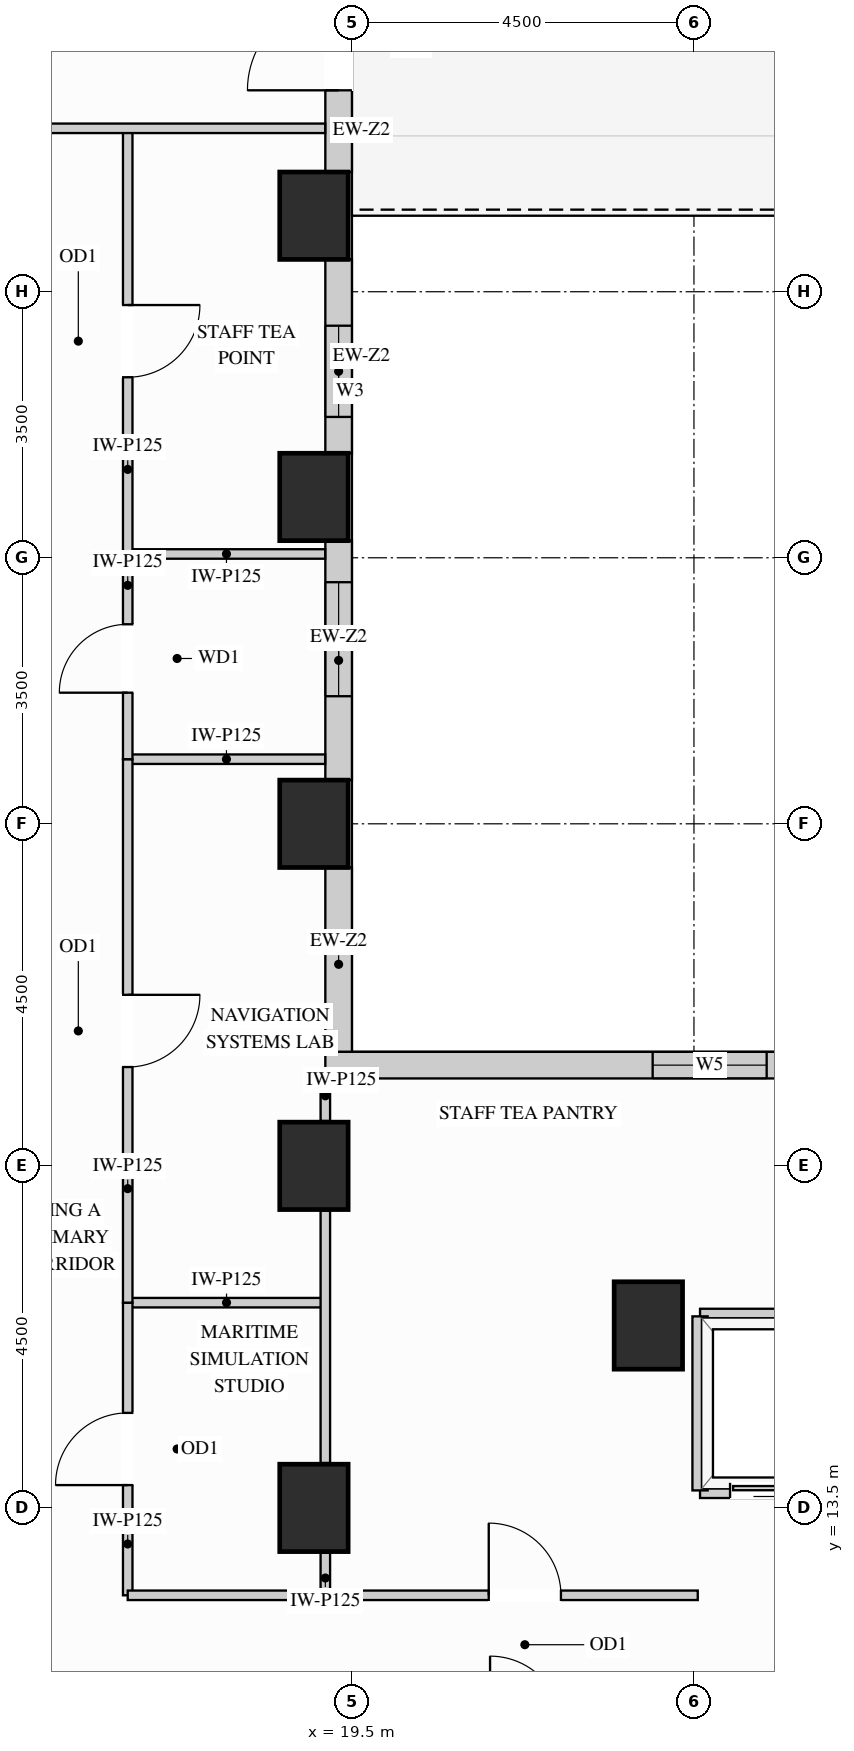
"""IFC4 building model, lengths in metres.
Left out: names, types, materials, properties, quantities, classifications, styles, units other than length and angle.
Written with IfcOpenShell. Run it as: python <this file> out.ifc"""

import sys

from ifc_helpers import new_model, si_unit, direction, frame, frame_2d, origin, origin_2d, place, context, subcontext, project, spatial, rectangle, extrude, source, transform, mapped, element, fill, save


model = new_model("IFC4")
c1 = context("Model", 3, precision=1e-05, world=origin(), true_north=direction((0.0, 1.0)))
c2 = subcontext(c1, "Body", "Model", "MODEL_VIEW")
j1 = project(units=[si_unit("LENGTHUNIT", "METRE"), si_unit("PLANEANGLEUNIT", "RADIAN")], contexts=[c1])
p1 = place(None, origin())
s1 = spatial("IfcSite", under=j1, at=p1, CompositionType="ELEMENT")
p2 = place(p1, origin())
s2 = spatial("IfcBuilding", under=s1, at=p2, CompositionType="ELEMENT")
p3 = place(p2, frame((0.0, 0.0, 127.8)))
s3 = spatial("IfcBuildingStorey", under=s2, at=p3, CompositionType="ELEMENT", Elevation=127.8)
m1 = source(origin(), c2, "Body", "SweptSolid", [
    extrude(rectangle(XDim=0.9, YDim=1.15, at=origin_2d()), origin(), (0.0, 0.0, 1.0), 3.38),
])
for number, where, z_axis, x_axis in (
    (1, (19.0, 13.5, 0.0), (0.0, 0.0, 1.0), (1.0, 0.0, 0.0)),
    (2, (19.0, 18.0, 0.0), (0.0, 0.0, 1.0), (1.0, 0.0, 0.0)),
    (3, (19.0, 22.5, 0.0), (0.0, 0.0, 1.0), (1.0, 0.0, 0.0)),
    (4, (19.0, 26.8, 0.0), (0.0, 0.0, 1.0), (1.0, 0.0, 0.0)),
    (5, (19.0, 30.5, 0.0), (0.0, 0.0, 1.0), (1.0, 0.0, 0.0)),
    (6, (23.4, 15.9, 0.0), (0.0, 0.0, 1.0), (1.0, 0.0, 0.0)),
):
    element("IfcColumn", number, at=place(p3, frame(where, z_axis=z_axis, x_axis=x_axis)), inside=s3, PredefinedType="COLUMN", context=c2, shape_type="MappedRepresentation", body=[
        mapped(m1, transform((0.0, 0.0, 0.0), x_axis=(1.0, 0.0, 0.0), y_axis=(0.0, 1.0, 0.0), z_axis=(0.0, 0.0, 1.0))),
    ])
m2 = source(origin(), c2, "Body", "SweptSolid", [
    extrude(rectangle(XDim=2.429, YDim=0.35, at=frame_2d((1.214, 0.0))), origin(), (0.0, 0.0, 1.0), 2.519),
])
p4 = place(p3, frame((19.325, 19.498, 0.0), z_axis=(0.0, 0.0, 1.0), x_axis=(0.0, 1.0, 0.0)))
e7 = element("IfcWall", 7, at=p4, inside=s3, PredefinedType="SOLIDWALL", context=c2, shape_type="MappedRepresentation", body=[
    mapped(m2, transform((0.0, 0.0, 0.0), x_axis=(1.0, 0.0, 0.0), y_axis=(0.0, 1.0, 0.0), z_axis=(0.0, 0.0, 1.0))),
])
p5 = place(p3, frame((19.325, 23.073, 0.0), z_axis=(0.0, 0.0, 1.0), x_axis=(0.0, 1.0, 0.0)))
e8 = element("IfcWall", 8, at=p5, inside=s3, PredefinedType="SOLIDWALL", context=c2, shape_type="SweptSolid", body=[
    extrude(rectangle(XDim=3.154, YDim=0.35, at=frame_2d((1.577, 0.0))), origin(), (0.0, 0.0, 1.0), 2.519),
])
p6 = place(p5, frame((1.105, 0.0, 0.78)))
e9 = element("IfcOpeningElement", 9, at=p6, cuts=e8, PredefinedType="OPENING", context=c2, shape_type="SweptSolid", body=[
    extrude(rectangle(XDim=1.5, YDim=1.559, at=frame_2d((0.75, 0.78))), frame((0.0, 0.185, 0.0), z_axis=(0.0, -1.0, 0.0), x_axis=(1.0, 0.0, 0.0)), (0.0, 0.0, 1.0), 0.37),
])
p7 = place(p3, frame((19.325, 27.373, 0.0), z_axis=(0.0, 0.0, 1.0), x_axis=(0.0, 1.0, 0.0)))
e10 = element("IfcWall", 10, at=p7, inside=s3, PredefinedType="SOLIDWALL", context=c2, shape_type="SweptSolid", body=[
    extrude(rectangle(XDim=2.554, YDim=0.35, at=frame_2d((1.277, 0.0))), origin(), (0.0, 0.0, 1.0), 2.519),
])
p8 = place(p7, frame((0.48, 0.0, 0.78)))
e11 = element("IfcOpeningElement", 11, at=p8, cuts=e10, PredefinedType="OPENING", context=c2, shape_type="SweptSolid", body=[
    extrude(rectangle(XDim=1.2, YDim=1.559, at=frame_2d((0.6, 0.78))), frame((0.0, 0.185, 0.0), z_axis=(0.0, -1.0, 0.0), x_axis=(1.0, 0.0, 0.0)), (0.0, 0.0, 1.0), 0.37),
])
p9 = place(p3, frame((19.325, 31.073, 0.0), z_axis=(0.0, 0.0, 1.0), x_axis=(0.0, 1.0, 0.0)))
e12 = element("IfcWall", 12, at=p9, inside=s3, PredefinedType="SOLIDWALL", context=c2, shape_type="SweptSolid", body=[
    extrude(rectangle(XDim=3.354, YDim=0.35, at=frame_2d((1.677, 0.0))), origin(), (0.0, 0.0, 1.0), 2.519),
])
p10 = place(p9, frame((1.077, 0.0, 0.0)))
e13 = element("IfcOpeningElement", 13, at=p10, cuts=e12, PredefinedType="OPENING", context=c2, shape_type="SweptSolid", body=[
    extrude(rectangle(XDim=1.2, YDim=2.15, at=frame_2d((0.6, 1.075))), frame((0.0, 0.185, 0.0), z_axis=(0.0, -1.0, 0.0), x_axis=(1.0, 0.0, 0.0)), (0.0, 0.0, 1.0), 0.37),
])
p11 = place(p3, frame((34.75, 19.325, 0.0), z_axis=(0.0, 0.0, 1.0), x_axis=(-1.0, 0.0, 0.0)))
e14 = element("IfcWall", 14, at=p11, inside=s3, PredefinedType="SOLIDWALL", context=c2, shape_type="SweptSolid", body=[
    extrude(rectangle(XDim=15.6, YDim=0.35, at=frame_2d((7.8, 0.0))), origin(), (0.0, 0.0, 1.0), 3.365),
])
p12 = place(p11, frame((4.307, 0.0, 0.78)))
e15 = element("IfcOpeningElement", 15, at=p12, cuts=e14, PredefinedType="OPENING", context=c2, shape_type="SweptSolid", body=[
    extrude(rectangle(XDim=1.5, YDim=2.0, at=frame_2d((0.75, 1.0))), frame((0.0, 0.185, 0.0), z_axis=(0.0, -1.0, 0.0), x_axis=(1.0, 0.0, 0.0)), (0.0, 0.0, 1.0), 0.37),
])
p13 = place(p11, frame((9.793, 0.0, 0.78)))
e16 = element("IfcOpeningElement", 16, at=p13, cuts=e14, PredefinedType="OPENING", context=c2, shape_type="SweptSolid", body=[
    extrude(rectangle(XDim=1.5, YDim=2.0, at=frame_2d((0.75, 1.0))), frame((0.0, 0.185, 0.0), z_axis=(0.0, -1.0, 0.0), x_axis=(1.0, 0.0, 0.0)), (0.0, 0.0, 1.0), 0.37),
])
m3 = source(origin(), c2, "Body", "SweptSolid", [
    extrude(rectangle(XDim=2.6, YDim=0.125, at=frame_2d((1.3, 0.0))), origin(), (0.0, 0.0, 1.0), 3.365),
])
p14 = place(p3, frame((16.55, 16.2, 0.0), z_axis=(0.0, 0.0, 1.0), x_axis=(1.0, 0.0, 0.0)))
e17 = element("IfcWall", 17, at=p14, inside=s3, PredefinedType="PARTITIONING", context=c2, shape_type="MappedRepresentation", body=[
    mapped(m3, transform((0.0, 0.0, 0.0), x_axis=(1.0, 0.0, 0.0), y_axis=(0.0, 1.0, 0.0), z_axis=(0.0, 0.0, 1.0))),
])
m4 = source(origin(), c2, "Body", "SweptSolid", [
    extrude(rectangle(XDim=2.598, YDim=0.125, at=frame_2d((1.299, 0.0))), origin(), (0.0, 0.0, 1.0), 3.365),
])
for number, where, z_axis, x_axis in (
    (18, (16.55, 23.35, 0.0), (0.0, 0.0, 1.0), (1.0, 0.0, 0.0)),
    (19, (16.55, 26.05, 0.0), (0.0, 0.0, 1.0), (1.0, 0.0, 0.0)),
):
    element("IfcWall", number, at=place(p3, frame(where, z_axis=z_axis, x_axis=x_axis)), inside=s3, PredefinedType="PARTITIONING", context=c2, shape_type="MappedRepresentation", body=[
        mapped(m4, transform((0.0, 0.0, 0.0), x_axis=(1.0, 0.0, 0.0), y_axis=(0.0, 1.0, 0.0), z_axis=(0.0, 0.0, 1.0))),
    ])
m5 = source(origin(), c2, "Body", "SweptSolid", [
    extrude(rectangle(XDim=0.56, YDim=0.125, at=frame_2d((0.28, 0.0))), origin(), (0.0, 0.0, 1.0), 2.677),
])
p15 = place(p3, frame((19.15, 12.35, 0.0), z_axis=(0.0, 0.0, 1.0), x_axis=(0.0, 1.0, 0.0)))
e20 = element("IfcWall", 20, at=p15, inside=s3, PredefinedType="PARTITIONING", context=c2, shape_type="MappedRepresentation", body=[
    mapped(m5, transform((0.0, 0.0, 0.0), x_axis=(1.0, 0.0, 0.0), y_axis=(0.0, 1.0, 0.0), z_axis=(0.0, 0.0, 1.0))),
])
m6 = source(origin(), c2, "Body", "SweptSolid", [
    extrude(rectangle(XDim=3.32, YDim=0.125, at=frame_2d((1.66, 0.0))), origin(), (0.0, 0.0, 1.0), 2.677),
])
p16 = place(p3, frame((19.15, 14.09, 0.0), z_axis=(0.0, 0.0, 1.0), x_axis=(0.0, 1.0, 0.0)))
e21 = element("IfcWall", 21, at=p16, inside=s3, PredefinedType="PARTITIONING", context=c2, shape_type="MappedRepresentation", body=[
    mapped(m6, transform((0.0, 0.0, 0.0), x_axis=(1.0, 0.0, 0.0), y_axis=(0.0, 1.0, 0.0), z_axis=(0.0, 0.0, 1.0))),
])
m7 = source(origin(), c2, "Body", "SweptSolid", [
    extrude(rectangle(XDim=0.558, YDim=0.125, at=frame_2d((0.279, 0.0))), origin(), (0.0, 0.0, 1.0), 2.519),
])
p17 = place(p3, frame((19.15, 18.59, 0.0), z_axis=(0.0, 0.0, 1.0), x_axis=(0.0, 1.0, 0.0)))
e22 = element("IfcWall", 22, at=p17, inside=s3, PredefinedType="PARTITIONING", context=c2, shape_type="MappedRepresentation", body=[
    mapped(m7, transform((0.0, 0.0, 0.0), x_axis=(1.0, 0.0, 0.0), y_axis=(0.0, 1.0, 0.0), z_axis=(0.0, 0.0, 1.0))),
])
p18 = place(p3, frame((16.55, 12.35, 0.0), z_axis=(0.0, 0.0, 1.0), x_axis=(0.0, 1.0, 0.0)))
e23 = element("IfcWall", 23, at=p18, inside=s3, PredefinedType="PARTITIONING", context=c2, shape_type="SweptSolid", body=[
    extrude(rectangle(XDim=3.85, YDim=0.125, at=frame_2d((1.925, 0.0))), origin(), (0.0, 0.0, 1.0), 3.365),
])
p19 = place(p18, frame((1.45, 0.0, 0.0)))
e24 = element("IfcOpeningElement", 24, at=p19, cuts=e23, PredefinedType="OPENING", context=c2, shape_type="SweptSolid", body=[
    extrude(rectangle(XDim=0.95, YDim=2.15, at=frame_2d((0.475, 1.075))), frame((0.0, 0.073, 0.0), z_axis=(0.0, -1.0, 0.0), x_axis=(1.0, 0.0, 0.0)), (0.0, 0.0, 1.0), 0.145),
])
p20 = place(p3, frame((16.55, 16.2, 0.0), z_axis=(0.0, 0.0, 1.0), x_axis=(0.0, 1.0, 0.0)))
e25 = element("IfcWall", 25, at=p20, inside=s3, PredefinedType="PARTITIONING", context=c2, shape_type="SweptSolid", body=[
    extrude(rectangle(XDim=7.15, YDim=0.125, at=frame_2d((3.575, 0.0))), origin(), (0.0, 0.0, 1.0), 3.365),
])
p21 = place(p20, frame((3.1, 0.0, 0.0)))
e26 = element("IfcOpeningElement", 26, at=p21, cuts=e25, PredefinedType="OPENING", context=c2, shape_type="SweptSolid", body=[
    extrude(rectangle(XDim=0.95, YDim=2.15, at=frame_2d((0.475, 1.075))), frame((0.0, 0.073, 0.0), z_axis=(0.0, -1.0, 0.0), x_axis=(1.0, 0.0, 0.0)), (0.0, 0.0, 1.0), 0.145),
])
p22 = place(p3, frame((16.55, 26.05, 0.0), z_axis=(0.0, 0.0, 1.0), x_axis=(0.0, 1.0, 0.0)))
e27 = element("IfcWall", 27, at=p22, inside=s3, PredefinedType="PARTITIONING", context=c2, shape_type="SweptSolid", body=[
    extrude(rectangle(XDim=5.6, YDim=0.125, at=frame_2d((2.8, 0.0))), origin(), (0.0, 0.0, 1.0), 3.365),
])
p23 = place(p22, frame((2.325, 0.0, 0.0)))
e28 = element("IfcOpeningElement", 28, at=p23, cuts=e27, PredefinedType="OPENING", context=c2, shape_type="SweptSolid", body=[
    extrude(rectangle(XDim=0.95, YDim=2.15, at=frame_2d((0.475, 1.075))), frame((0.0, 0.073, 0.0), z_axis=(0.0, -1.0, 0.0), x_axis=(1.0, 0.0, 0.0)), (0.0, 0.0, 1.0), 0.145),
])
p24 = place(p3, frame((16.55, 23.35, 0.0), z_axis=(0.0, 0.0, 1.0), x_axis=(0.0, 1.0, 0.0)))
e29 = element("IfcWall", 29, at=p24, inside=s3, PredefinedType="PARTITIONING", context=c2, shape_type="SweptSolid", body=[
    extrude(rectangle(XDim=2.7, YDim=0.125, at=frame_2d((1.35, 0.0))), origin(), (0.0, 0.0, 1.0), 3.365),
])
p25 = place(p24, frame((0.875, 0.0, 0.0)))
e30 = element("IfcOpeningElement", 30, at=p25, cuts=e29, PredefinedType="OPENING", context=c2, shape_type="SweptSolid", body=[
    extrude(rectangle(XDim=0.9, YDim=2.15, at=frame_2d((0.45, 1.075))), frame((0.0, 0.073, 0.0), z_axis=(0.0, -1.0, 0.0), x_axis=(1.0, 0.0, 0.0)), (0.0, 0.0, 1.0), 0.145),
])
m8 = source(origin(), c2, "Body", "SweptSolid", [
    extrude(rectangle(XDim=7.498, YDim=0.125, at=frame_2d((3.749, 0.0))), origin(), (0.0, 0.0, 1.0), 2.828),
])
p26 = place(p3, frame((11.65, 31.65, 0.0), z_axis=(0.0, 0.0, 1.0), x_axis=(1.0, 0.0, 0.0)))
e31 = element("IfcWall", 31, at=p26, inside=s3, PredefinedType="PARTITIONING", context=c2, shape_type="MappedRepresentation", body=[
    mapped(m8, transform((0.0, 0.0, 0.0), x_axis=(1.0, 0.0, 0.0), y_axis=(0.0, 1.0, 0.0), z_axis=(0.0, 0.0, 1.0))),
])
m9 = source(origin(), c2, "Body", "SweptSolid", [
    extrude(rectangle(XDim=2.95, YDim=0.125, at=frame_2d((1.475, 0.0))), origin(), (0.0, 0.0, 1.0), 3.365),
])
p27 = place(p3, frame((16.55, 12.35, 0.0), z_axis=(0.0, 0.0, 1.0), x_axis=(1.0, 0.0, 0.0)))
e32 = element("IfcWall", 32, at=p27, inside=s3, PredefinedType="PARTITIONING", context=c2, shape_type="MappedRepresentation", body=[
    mapped(m9, transform((0.0, 0.0, 0.0), x_axis=(1.0, 0.0, 0.0), y_axis=(0.0, 1.0, 0.0), z_axis=(0.0, 0.0, 1.0))),
])
p28 = place(p3, frame((19.5, 12.35, 0.0), z_axis=(0.0, 0.0, 1.0), x_axis=(1.0, 0.0, 0.0)))
e33 = element("IfcWall", 33, at=p28, inside=s3, PredefinedType="PARTITIONING", context=c2, shape_type="SweptSolid", body=[
    extrude(rectangle(XDim=4.55, YDim=0.125, at=frame_2d((2.275, 0.0))), origin(), (0.0, 0.0, 1.0), 3.365),
])
p29 = place(p28, frame((1.8, 0.0, 0.0)))
e34 = element("IfcOpeningElement", 34, at=p29, cuts=e33, PredefinedType="OPENING", context=c2, shape_type="SweptSolid", body=[
    extrude(rectangle(XDim=0.95, YDim=2.15, at=frame_2d((0.475, 1.075))), frame((0.0, 0.073, 0.0), z_axis=(0.0, -1.0, 0.0), x_axis=(1.0, 0.0, 0.0)), (0.0, 0.0, 1.0), 0.145),
])
m10 = source(origin(), c2, "Body", "SweptSolid", [
    extrude(rectangle(XDim=1.89, YDim=0.2, at=frame_2d((0.945, 0.0))), origin(), (0.0, 0.0, 1.0), 2.677),
])
p30 = place(p3, frame((24.08, 16.02, 0.0), z_axis=(0.0, 0.0, 1.0), x_axis=(1.0, 0.0, 0.0)))
e35 = element("IfcWall", 35, at=p30, inside=s3, PredefinedType="PARTITIONING", context=c2, shape_type="MappedRepresentation", body=[
    mapped(m10, transform((0.0, 0.0, 0.0), x_axis=(1.0, 0.0, 0.0), y_axis=(0.0, 1.0, 0.0), z_axis=(0.0, 0.0, 1.0))),
])
p31 = place(p3, frame((24.08, 13.73, 0.0), z_axis=(0.0, 0.0, 1.0), x_axis=(1.0, 0.0, 0.0)))
e36 = element("IfcWall", 36, at=p31, inside=s3, PredefinedType="PARTITIONING", context=c2, shape_type="SweptSolid", body=[
    extrude(rectangle(XDim=1.89, YDim=0.2, at=frame_2d((0.945, 0.0))), origin(), (0.0, 0.0, 1.0), 2.446),
])
p32 = place(p31, frame((0.395, 0.0, 0.0)))
e37 = element("IfcOpeningElement", 37, at=p32, cuts=e36, PredefinedType="OPENING", context=c2, shape_type="SweptSolid", body=[
    extrude(rectangle(XDim=1.1, YDim=2.2, at=frame_2d((0.55, 1.1))), frame((0.0, 0.11, 0.0), z_axis=(0.0, -1.0, 0.0), x_axis=(1.0, 0.0, 0.0)), (0.0, 0.0, 1.0), 0.22),
])
m11 = source(origin(), c2, "Body", "SweptSolid", [
    extrude(rectangle(XDim=2.29, YDim=0.2, at=frame_2d((1.145, 0.0))), origin(), (0.0, 0.0, 1.0), 3.365),
])
p33 = place(p3, frame((24.08, 13.73, 0.0), z_axis=(0.0, 0.0, 1.0), x_axis=(0.0, 1.0, 0.0)))
e38 = element("IfcWall", 38, at=p33, inside=s3, PredefinedType="PARTITIONING", context=c2, shape_type="MappedRepresentation", body=[
    mapped(m11, transform((0.0, 0.0, 0.0), x_axis=(1.0, 0.0, 0.0), y_axis=(0.0, 1.0, 0.0), z_axis=(0.0, 0.0, 1.0))),
])
m12 = source(origin(), c2, "Body", "SweptSolid", [
    extrude(rectangle(XDim=1.2, YDim=2.15, at=frame_2d((0.6, 1.075))), frame((0.0, 0.025, 0.0), z_axis=(0.0, -1.0, 0.0), x_axis=(1.0, 0.0, 0.0)), (0.0, 0.0, 1.0), 0.05),
])
p34 = place(p10, frame((1.2, 0.0, 0.0), z_axis=(0.0, 0.0, 1.0), x_axis=(-1.0, 0.0, 0.0)))
e39 = element("IfcDoor", 39, at=p34, inside=s3, OperationType="SINGLE_SWING_LEFT", PredefinedType="DOOR", context=c2, shape_type="MappedRepresentation", body=[
    mapped(m12, transform((0.0, 0.0, 0.0), x_axis=(1.0, 0.0, 0.0), y_axis=(0.0, 1.0, 0.0), z_axis=(0.0, 0.0, 1.0))),
])
fill(e13, e39)
m13 = source(origin(), c2, "Body", "SweptSolid", [
    extrude(rectangle(XDim=1.1, YDim=2.2, at=frame_2d((0.55, 1.1))), frame((0.0, 0.025, 0.0), z_axis=(0.0, -1.0, 0.0), x_axis=(1.0, 0.0, 0.0)), (0.0, 0.0, 1.0), 0.05),
])
p35 = place(p32, origin())
e40 = element("IfcDoor", 40, at=p35, inside=s3, OperationType="SLIDING_TO_LEFT", PredefinedType="DOOR", context=c2, shape_type="MappedRepresentation", body=[
    mapped(m13, transform((0.0, 0.0, 0.0), x_axis=(1.0, 0.0, 0.0), y_axis=(0.0, 1.0, 0.0), z_axis=(0.0, 0.0, 1.0))),
])
fill(e37, e40)
m14 = source(origin(), c2, "Body", "SweptSolid", [
    extrude(rectangle(XDim=0.95, YDim=2.15, at=frame_2d((0.475, 1.075))), frame((0.0, 0.025, 0.0), z_axis=(0.0, -1.0, 0.0), x_axis=(1.0, 0.0, 0.0)), (0.0, 0.0, 1.0), 0.05),
])
p36 = place(p19, origin())
e41 = element("IfcDoor", 41, at=p36, inside=s3, OperationType="SINGLE_SWING_LEFT", PredefinedType="DOOR", context=c2, shape_type="MappedRepresentation", body=[
    mapped(m14, transform((0.0, 0.0, 0.0), x_axis=(1.0, 0.0, 0.0), y_axis=(0.0, 1.0, 0.0), z_axis=(0.0, 0.0, 1.0))),
])
fill(e24, e41)
p37 = place(p21, origin())
e42 = element("IfcDoor", 42, at=p37, inside=s3, OperationType="SINGLE_SWING_RIGHT", PredefinedType="DOOR", context=c2, shape_type="MappedRepresentation", body=[
    mapped(m14, transform((0.0, 0.0, 0.0), x_axis=(1.0, 0.0, 0.0), y_axis=(0.0, 1.0, 0.0), z_axis=(0.0, 0.0, 1.0))),
])
fill(e26, e42)
p38 = place(p23, origin())
e43 = element("IfcDoor", 43, at=p38, inside=s3, OperationType="SINGLE_SWING_RIGHT", PredefinedType="DOOR", context=c2, shape_type="MappedRepresentation", body=[
    mapped(m14, transform((0.0, 0.0, 0.0), x_axis=(1.0, 0.0, 0.0), y_axis=(0.0, 1.0, 0.0), z_axis=(0.0, 0.0, 1.0))),
])
fill(e28, e43)
p39 = place(p29, origin())
e44 = element("IfcDoor", 44, at=p39, inside=s3, OperationType="SINGLE_SWING_LEFT", PredefinedType="DOOR", context=c2, shape_type="MappedRepresentation", body=[
    mapped(m14, transform((0.0, 0.0, 0.0), x_axis=(1.0, 0.0, 0.0), y_axis=(0.0, 1.0, 0.0), z_axis=(0.0, 0.0, 1.0))),
])
fill(e34, e44)
m15 = source(origin(), c2, "Body", "SweptSolid", [
    extrude(rectangle(XDim=0.9, YDim=2.15, at=frame_2d((0.45, 1.075))), frame((0.0, 0.025, 0.0), z_axis=(0.0, -1.0, 0.0), x_axis=(1.0, 0.0, 0.0)), (0.0, 0.0, 1.0), 0.05),
])
p40 = place(p25, origin())
e45 = element("IfcDoor", 45, at=p40, inside=s3, OperationType="SINGLE_SWING_LEFT", PredefinedType="DOOR", context=c2, shape_type="MappedRepresentation", body=[
    mapped(m15, transform((0.0, 0.0, 0.0), x_axis=(1.0, 0.0, 0.0), y_axis=(0.0, 1.0, 0.0), z_axis=(0.0, 0.0, 1.0))),
])
fill(e30, e45)
m16 = source(origin(), c2, "Body", "SweptSolid", [
    extrude(rectangle(XDim=1.2, YDim=1.559, at=frame_2d((0.6, 0.78))), frame((0.0, 0.03, 0.0), z_axis=(0.0, -1.0, 0.0), x_axis=(1.0, 0.0, 0.0)), (0.0, 0.0, 1.0), 0.06),
])
p41 = place(p8, origin())
e46 = element("IfcWindow", 46, at=p41, inside=s3, PartitioningType="SINGLE_PANEL", PredefinedType="WINDOW", context=c2, shape_type="MappedRepresentation", body=[
    mapped(m16, transform((0.0, 0.0, 0.0), x_axis=(1.0, 0.0, 0.0), y_axis=(0.0, 1.0, 0.0), z_axis=(0.0, 0.0, 1.0))),
])
fill(e11, e46)
m17 = source(origin(), c2, "Body", "SweptSolid", [
    extrude(rectangle(XDim=1.5, YDim=1.559, at=frame_2d((0.75, 0.78))), frame((0.0, 0.03, 0.0), z_axis=(0.0, -1.0, 0.0), x_axis=(1.0, 0.0, 0.0)), (0.0, 0.0, 1.0), 0.06),
])
p42 = place(p6, origin())
e47 = element("IfcWindow", 47, at=p42, inside=s3, PartitioningType="SINGLE_PANEL", PredefinedType="WINDOW", context=c2, shape_type="MappedRepresentation", body=[
    mapped(m17, transform((0.0, 0.0, 0.0), x_axis=(1.0, 0.0, 0.0), y_axis=(0.0, 1.0, 0.0), z_axis=(0.0, 0.0, 1.0))),
])
fill(e9, e47)
m18 = source(origin(), c2, "Body", "SweptSolid", [
    extrude(rectangle(XDim=1.5, YDim=2.0, at=frame_2d((0.75, 1.0))), frame((0.0, 0.03, 0.0), z_axis=(0.0, -1.0, 0.0), x_axis=(1.0, 0.0, 0.0)), (0.0, 0.0, 1.0), 0.06),
])
p43 = place(p13, origin())
e48 = element("IfcWindow", 48, at=p43, inside=s3, PartitioningType="SINGLE_PANEL", PredefinedType="WINDOW", context=c2, shape_type="MappedRepresentation", body=[
    mapped(m18, transform((0.0, 0.0, 0.0), x_axis=(1.0, 0.0, 0.0), y_axis=(0.0, 1.0, 0.0), z_axis=(0.0, 0.0, 1.0))),
])
fill(e16, e48)
save(model, sys.argv[1])
